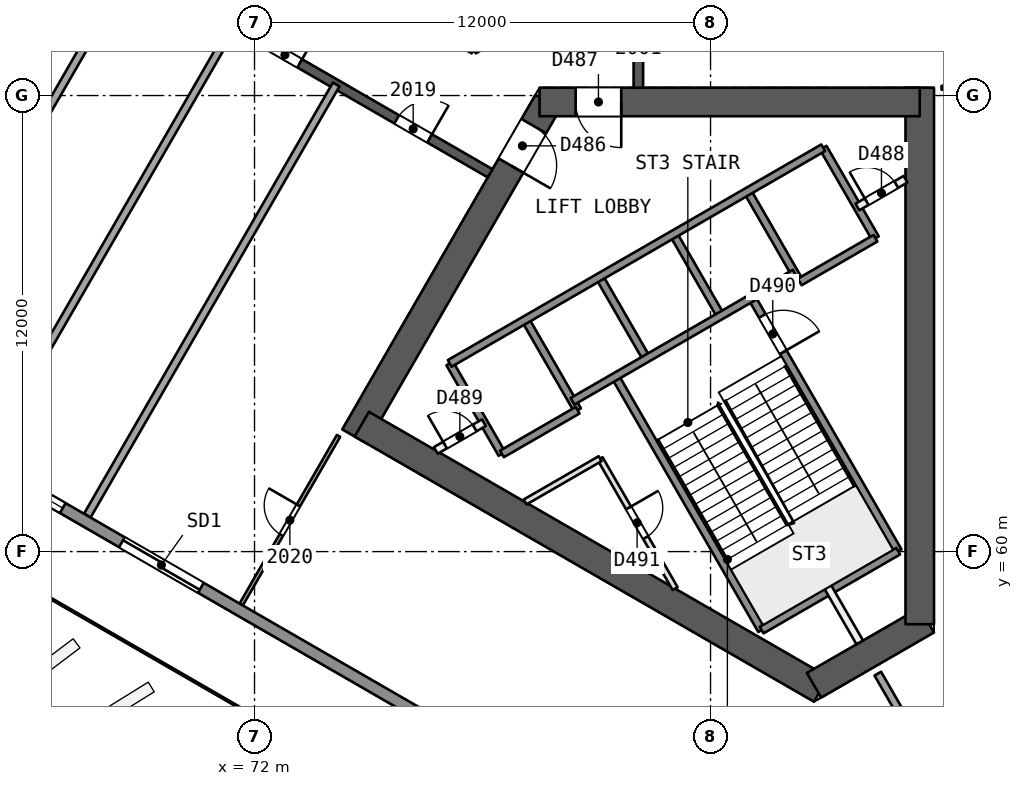
"""IFC4 building model, lengths in metres.
Left out: names, types, materials, properties, quantities, classifications, styles, units other than length and angle.
Written with IfcOpenShell. Run it as: python <this file> out.ifc"""

import sys

from ifc_helpers import new_model, si_unit, direction, frame, frame_2d, origin, place, context, subcontext, project, spatial, rectangle, extrude, element, fill, save


model = new_model("IFC4")
c1 = context("Model", 3, precision=1e-05, world=origin(), true_north=direction((0.0, 1.0)))
c2 = subcontext(c1, "Body", "Model", "MODEL_VIEW")
j1 = project(units=[si_unit("LENGTHUNIT", "METRE"), si_unit("PLANEANGLEUNIT", "RADIAN")], contexts=[c1])
p1 = place(None, origin())
s1 = spatial("IfcSite", under=j1, at=p1, CompositionType="ELEMENT")
p2 = place(p1, origin())
s2 = spatial("IfcBuilding", under=s1, at=p2, CompositionType="ELEMENT")
p3 = place(p2, frame((0.0, 0.0, 86.9)))
s3 = spatial("IfcBuildingStorey", under=s2, at=p3, CompositionType="ELEMENT", Elevation=86.9)
p4 = place(p3, frame((79.717, 71.831, 0.0), z_axis=(0.0, 0.0, 1.0), x_axis=(-0.499996230114, -0.866027580318, 0.0)))
e1 = element("IfcWall", 1, at=p4, inside=s3, PredefinedType="SHEAR", context=c2, shape_type="SweptSolid", body=[
    extrude(rectangle(XDim=10.164, YDim=0.75, at=frame_2d((5.082, 0.0))), origin(), (0.0, 0.0, 1.0), 3.7),
])
p5 = place(p4, frame((0.733, 0.0, 0.0)))
e2 = element("IfcOpeningElement", 2, at=p5, cuts=e1, PredefinedType="OPENING", context=c2, shape_type="SweptSolid", body=[
    extrude(rectangle(XDim=1.2, YDim=2.1, at=frame_2d((0.6, 1.05))), frame((0.0, 0.385, 0.0), z_axis=(0.0, -1.0, 0.0), x_axis=(1.0, 0.0, 0.0)), (0.0, 0.0, 1.0), 0.771),
])
p6 = place(p3, frame((74.822, 63.354, 0.0), z_axis=(0.0, 0.0, 1.0), x_axis=(0.8660248072, -0.500001033313, 0.0)))
e3 = element("IfcWall", 3, at=p6, inside=s3, PredefinedType="SHEAR", context=c2, shape_type="SweptSolid", body=[
    extrude(rectangle(XDim=13.958, YDim=0.75, at=frame_2d((6.979, 0.0))), origin(), (0.0, 0.0, 1.0), 3.7),
])
p7 = place(p3, frame((86.723, 56.483, 0.0), z_axis=(0.0, 0.0, 1.0), x_axis=(0.866017201164, 0.500014207086, 0.0)))
e4 = element("IfcWall", 4, at=p7, inside=s3, PredefinedType="SHEAR", context=c2, shape_type="SweptSolid", body=[
    extrude(rectangle(XDim=3.429, YDim=0.75, at=frame_2d((1.714, 0.0))), origin(), (0.0, 0.0, 1.0), 3.7),
])
p8 = place(p3, frame((89.505, 58.089, 0.0), z_axis=(0.0, 0.0, 1.0), x_axis=(0.0, 1.0, 0.0)))
e5 = element("IfcWall", 5, at=p8, inside=s3, PredefinedType="SHEAR", context=c2, shape_type="SweptSolid", body=[
    extrude(rectangle(XDim=14.117, YDim=0.75, at=frame_2d((7.059, 0.0))), origin(), (0.0, 0.0, 1.0), 3.7),
])
p9 = place(p3, frame((89.505, 71.831, 0.0), z_axis=(0.0, 0.0, 1.0), x_axis=(-1.0, 0.0, 0.0)))
e6 = element("IfcWall", 6, at=p9, inside=s3, PredefinedType="SHEAR", context=c2, shape_type="SweptSolid", body=[
    extrude(rectangle(XDim=10.005, YDim=0.75, at=frame_2d((5.002, 0.0))), origin(), (0.0, 0.0, 1.0), 3.7),
])
p10 = place(p9, frame((7.855, 0.0, 0.0)))
e7 = element("IfcOpeningElement", 7, at=p10, cuts=e6, PredefinedType="OPENING", context=c2, shape_type="SweptSolid", body=[
    extrude(rectangle(XDim=1.2, YDim=2.1, at=frame_2d((0.6, 1.05))), frame((0.0, 0.385, 0.0), z_axis=(0.0, -1.0, 0.0), x_axis=(1.0, 0.0, 0.0)), (0.0, 0.0, 1.0), 0.771),
])
p11 = place(p3, frame((82.1, 72.206, 0.0), z_axis=(0.0, 0.0, 1.0), x_axis=(0.0, 1.0, 0.0)))
e8 = element("IfcWall", 8, at=p11, inside=s3, PredefinedType="SHEAR", context=c2, shape_type="SweptSolid", body=[
    extrude(rectangle(XDim=15.588, YDim=0.25, at=frame_2d((7.794, 0.0))), origin(), (0.0, 0.0, 1.0), 3.2),
])
p12 = place(p11, frame((1.527, 0.0, 0.0)))
e9 = element("IfcOpeningElement", 9, at=p12, cuts=e8, PredefinedType="OPENING", context=c2, shape_type="SweptSolid", body=[
    extrude(rectangle(XDim=1.0, YDim=2.1, at=frame_2d((0.5, 1.05))), frame((0.0, 0.135, 0.0), z_axis=(0.0, -1.0, 0.0), x_axis=(1.0, 0.0, 0.0)), (0.0, 0.0, 1.0), 0.271),
])
p13 = place(p11, frame((8.694, 0.0, 0.0)))
e10 = element("IfcOpeningElement", 10, at=p13, cuts=e8, PredefinedType="OPENING", context=c2, shape_type="SweptSolid", body=[
    extrude(rectangle(XDim=1.1, YDim=2.1, at=frame_2d((0.55, 1.05))), frame((0.0, 0.135, 0.0), z_axis=(0.0, -1.0, 0.0), x_axis=(1.0, 0.0, 0.0)), (0.0, 0.0, 1.0), 0.271),
])
p14 = place(p11, frame((13.062, 0.0, 0.0)))
e11 = element("IfcOpeningElement", 11, at=p14, cuts=e8, PredefinedType="OPENING", context=c2, shape_type="SweptSolid", body=[
    extrude(rectangle(XDim=1.0, YDim=2.1, at=frame_2d((0.5, 1.05))), frame((0.0, 0.135, 0.0), z_axis=(0.0, -1.0, 0.0), x_axis=(1.0, 0.0, 0.0)), (0.0, 0.0, 1.0), 0.271),
])
p15 = place(p3, frame((64.7, 77.748, 0.0), z_axis=(0.0, 0.0, 1.0), x_axis=(0.866026492143, -0.499998114903, 0.0)))
e12 = element("IfcWall", 12, at=p15, inside=s3, PredefinedType="SHEAR", context=c2, shape_type="SweptSolid", body=[
    extrude(rectangle(XDim=15.588, YDim=0.25, at=frame_2d((7.794, 0.0))), origin(), (0.0, 0.0, 1.0), 3.2),
])
p16 = place(p15, frame((1.738, 0.0, 0.0)))
e13 = element("IfcOpeningElement", 13, at=p16, cuts=e12, PredefinedType="OPENING", context=c2, shape_type="SweptSolid", body=[
    extrude(rectangle(XDim=1.2, YDim=2.4, at=frame_2d((0.6, 1.2))), frame((0.0, 0.135, 0.0), z_axis=(0.0, -1.0, 0.0), x_axis=(1.0, 0.0, 0.0)), (0.0, 0.0, 1.0), 0.271),
])
p17 = place(p15, frame((5.785, 0.0, 0.0)))
e14 = element("IfcOpeningElement", 14, at=p17, cuts=e12, PredefinedType="OPENING", context=c2, shape_type="SweptSolid", body=[
    extrude(rectangle(XDim=0.9, YDim=2.1, at=frame_2d((0.45, 1.05))), frame((0.0, 0.135, 0.0), z_axis=(0.0, -1.0, 0.0), x_axis=(1.0, 0.0, 0.0)), (0.0, 0.0, 1.0), 0.271),
])
p18 = place(p15, frame((8.903, 0.0, 0.0)))
e15 = element("IfcOpeningElement", 15, at=p18, cuts=e12, PredefinedType="OPENING", context=c2, shape_type="SweptSolid", body=[
    extrude(rectangle(XDim=0.9, YDim=2.1, at=frame_2d((0.45, 1.05))), frame((0.0, 0.135, 0.0), z_axis=(0.0, -1.0, 0.0), x_axis=(1.0, 0.0, 0.0)), (0.0, 0.0, 1.0), 0.271),
])
p19 = place(p15, frame((12.75, 0.0, 0.0)))
e16 = element("IfcOpeningElement", 16, at=p19, cuts=e12, PredefinedType="OPENING", context=c2, shape_type="SweptSolid", body=[
    extrude(rectangle(XDim=1.0, YDim=2.1, at=frame_2d((0.5, 1.05))), frame((0.0, 0.135, 0.0), z_axis=(0.0, -1.0, 0.0), x_axis=(1.0, 0.0, 0.0)), (0.0, 0.0, 1.0), 0.271),
])
p20 = place(p3, frame((90.079, 72.206, 0.0), z_axis=(0.0, 0.0, 1.0), x_axis=(1.0, 0.0, 0.0)))
e17 = element("IfcWall", 17, at=p20, inside=s3, PredefinedType="PARTITIONING", context=c2, shape_type="SweptSolid", body=[
    extrude(rectangle(XDim=5.123, YDim=0.1, at=frame_2d((2.562, 0.0))), origin(), (0.0, 0.0, 1.0), 3.2),
])
p21 = place(p20, frame((2.112, 0.0, 0.0)))
e18 = element("IfcOpeningElement", 18, at=p21, cuts=e17, PredefinedType="OPENING", context=c2, shape_type="SweptSolid", body=[
    extrude(rectangle(XDim=0.9, YDim=2.1, at=frame_2d((0.45, 1.05))), frame((0.0, 0.061, 0.0), z_axis=(0.0, -1.0, 0.0), x_axis=(1.0, 0.0, 0.0)), (0.0, 0.0, 1.0), 0.121),
])
p22 = place(p3, frame((88.401, 56.789, 0.0), z_axis=(0.0, 0.0, 1.0), x_axis=(0.499995498429, -0.866028002752, 0.0)))
e19 = element("IfcWall", 19, at=p22, inside=s3, PredefinedType="PARTITIONING", context=c2, shape_type="SweptSolid", body=[
    extrude(rectangle(XDim=8.565, YDim=0.2, at=frame_2d((4.283, 0.0))), origin(), (0.0, 0.0, 1.0), 3.2),
])
for number, where, z_axis, x_axis in (
    (20, (62.199, 64.063, 0.0), (0.0, 0.0, 1.0), (0.5, 0.866, 0.0)),
    (21, (64.899, 62.504, 0.0), (0.0, 0.0, 1.0), (0.5, 0.866, 0.0)),
    (22, (67.599, 60.946, 0.0), (0.0, 0.0, 1.0), (0.5, 0.866, 0.0)),
):
    element("IfcWall", number, at=place(p3, frame(where, z_axis=z_axis, x_axis=x_axis)), inside=s3, PredefinedType="PARTITIONING", context=c2, shape_type="SweptSolid", body=[
        extrude(rectangle(XDim=13.102, YDim=0.2, at=frame_2d((6.551, 0.0))), origin(), (0.0, 0.0, 1.0), 3.2),
    ])
p23 = place(p3, frame((71.649, 58.607, 0.0), z_axis=(0.0, 0.0, 1.0), x_axis=(0.499972702148, 0.866041163633, 0.0)))
e23 = element("IfcWall", 23, at=p23, inside=s3, PredefinedType="PARTITIONING", context=c2, shape_type="SweptSolid", body=[
    extrude(rectangle(XDim=5.123, YDim=0.1, at=frame_2d((2.562, 0.0))), origin(), (0.0, 0.0, 1.0), 3.2),
])
p24 = place(p23, frame((2.112, 0.0, 0.0)))
e24 = element("IfcOpeningElement", 24, at=p24, cuts=e23, PredefinedType="OPENING", context=c2, shape_type="SweptSolid", body=[
    extrude(rectangle(XDim=0.9, YDim=2.1, at=frame_2d((0.45, 1.05))), frame((0.0, 0.061, 0.0), z_axis=(0.0, -1.0, 0.0), x_axis=(1.0, 0.0, 0.0)), (0.0, 0.0, 1.0), 0.121),
])
p25 = place(p3, frame((90.165, 47.745, 0.0), z_axis=(0.0, 0.0, 1.0), x_axis=(-0.866025940441, 0.499999070483, 0.0)))
e25 = element("IfcWall", 25, at=p25, inside=s3, PredefinedType="SOLIDWALL", context=c2, shape_type="SweptSolid", body=[
    extrude(rectangle(XDim=58.522, YDim=0.3, at=frame_2d((29.261, 0.0))), origin(), (0.0, 0.0, 1.0), 3.2),
])
p26 = place(p25, frame((44.294, 0.0, 0.0)))
e26 = element("IfcOpeningElement", 26, at=p26, cuts=e25, PredefinedType="OPENING", context=c2, shape_type="SweptSolid", body=[
    extrude(rectangle(XDim=2.4, YDim=2.4, at=frame_2d((1.2, 1.2))), frame((0.0, 0.161, 0.0), z_axis=(0.0, -1.0, 0.0), x_axis=(1.0, 0.0, 0.0)), (0.0, 0.0, 1.0), 0.321),
])
p27 = place(p25, frame((22.605, 0.0, 0.0)))
e27 = element("IfcOpeningElement", 27, at=p27, cuts=e25, PredefinedType="OPENING", context=c2, shape_type="SweptSolid", body=[
    extrude(rectangle(XDim=2.4, YDim=2.4, at=frame_2d((1.2, 1.2))), frame((0.0, 0.161, 0.0), z_axis=(0.0, -1.0, 0.0), x_axis=(1.0, 0.0, 0.0)), (0.0, 0.0, 1.0), 0.321),
])
p28 = place(p25, frame((10.658, 0.0, 0.0)))
e28 = element("IfcOpeningElement", 28, at=p28, cuts=e25, PredefinedType="OPENING", context=c2, shape_type="SweptSolid", body=[
    extrude(rectangle(XDim=2.4, YDim=2.4, at=frame_2d((1.2, 1.2))), frame((0.0, 0.161, 0.0), z_axis=(0.0, -1.0, 0.0), x_axis=(1.0, 0.0, 0.0)), (0.0, 0.0, 1.0), 0.321),
])
p29 = place(p25, frame((29.92, 0.0, 0.9)))
e29 = element("IfcOpeningElement", 29, at=p29, cuts=e25, PredefinedType="OPENING", context=c2, shape_type="SweptSolid", body=[
    extrude(rectangle(XDim=1.8, YDim=1.5, at=frame_2d((0.9, 0.75))), frame((0.0, 0.161, 0.0), z_axis=(0.0, -1.0, 0.0), x_axis=(1.0, 0.0, 0.0)), (0.0, 0.0, 1.0), 0.321),
])
p30 = place(p25, frame((26.802, 0.0, 0.9)))
e30 = element("IfcOpeningElement", 30, at=p30, cuts=e25, PredefinedType="OPENING", context=c2, shape_type="SweptSolid", body=[
    extrude(rectangle(XDim=1.8, YDim=1.5, at=frame_2d((0.9, 0.75))), frame((0.0, 0.161, 0.0), z_axis=(0.0, -1.0, 0.0), x_axis=(1.0, 0.0, 0.0)), (0.0, 0.0, 1.0), 0.321),
])
p31 = place(p3, frame((77.135, 64.952, 0.0), z_axis=(0.0, 0.0, 1.0), x_axis=(0.499996545922, -0.866027397988, 0.0)))
e31 = element("IfcWall", 31, at=p31, inside=s3, PredefinedType="SOLIDWALL", context=c2, shape_type="SweptSolid", body=[
    extrude(rectangle(XDim=2.75, YDim=0.2, at=frame_2d((1.375, 0.0))), origin(), (0.0, 0.0, 1.0), 3.2),
])
p32 = place(p3, frame((81.094, 62.445, 0.0), z_axis=(0.0, 0.0, 1.0), x_axis=(0.499990112884, -0.866031112038, 0.0)))
e32 = element("IfcWall", 32, at=p32, inside=s3, PredefinedType="PARTITIONING", context=c2, shape_type="SweptSolid", body=[
    extrude(rectangle(XDim=3.948, YDim=0.15, at=frame_2d((1.974, 0.0))), origin(), (0.0, 0.0, 1.0), 3.2),
])
p33 = place(p32, frame((1.496, 0.0, 0.0)))
e33 = element("IfcOpeningElement", 33, at=p33, cuts=e32, PredefinedType="OPENING", context=c2, shape_type="SweptSolid", body=[
    extrude(rectangle(XDim=0.9, YDim=2.1, at=frame_2d((0.45, 1.05))), frame((0.0, 0.085, 0.0), z_axis=(0.0, -1.0, 0.0), x_axis=(1.0, 0.0, 0.0)), (0.0, 0.0, 1.0), 0.171),
])
p34 = place(p3, frame((79.127, 66.102, 0.0), z_axis=(0.0, 0.0, 1.0), x_axis=(0.499996545922, -0.866027397988, 0.0)))
e34 = element("IfcWall", 34, at=p34, inside=s3, PredefinedType="SOLIDWALL", context=c2, shape_type="SweptSolid", body=[
    extrude(rectangle(XDim=2.75, YDim=0.2, at=frame_2d((1.375, 0.0))), origin(), (0.0, 0.0, 1.0), 3.2),
])
p35 = place(p3, frame((81.493, 64.604, 0.0), z_axis=(0.0, 0.0, 1.0), x_axis=(0.500006057782, -0.866021906294, 0.0)))
e35 = element("IfcWall", 35, at=p35, inside=s3, PredefinedType="SOLIDWALL", context=c2, shape_type="SweptSolid", body=[
    extrude(rectangle(XDim=7.7, YDim=0.2, at=frame_2d((3.85, 0.0))), origin(), (0.0, 0.0, 1.0), 3.2),
])
p36 = place(p3, frame((81.076, 67.227, 0.0), z_axis=(0.0, 0.0, 1.0), x_axis=(0.50000366821, -0.866023285932, 0.0)))
e36 = element("IfcWall", 36, at=p36, inside=s3, PredefinedType="SOLIDWALL", context=c2, shape_type="SweptSolid", body=[
    extrude(rectangle(XDim=2.48, YDim=0.2, at=frame_2d((1.24, 0.0))), origin(), (0.0, 0.0, 1.0), 3.2),
])
p37 = place(p3, frame((87.09, 59.06, 0.0), z_axis=(0.0, 0.0, 1.0), x_axis=(0.499937194881, -0.866061661301, 0.0)))
e37 = element("IfcWall", 37, at=p37, inside=s3, PredefinedType="PARTITIONING", context=c2, shape_type="SweptSolid", body=[
    extrude(rectangle(XDim=1.673, YDim=0.2, at=frame_2d((0.836, 0.0))), origin(), (0.0, 0.0, 1.0), 3.2),
])
p38 = place(p3, frame((83.024, 68.352, 0.0), z_axis=(0.0, 0.0, 1.0), x_axis=(0.50000366821, -0.866023285932, 0.0)))
e38 = element("IfcWall", 38, at=p38, inside=s3, PredefinedType="SOLIDWALL", context=c2, shape_type="SweptSolid", body=[
    extrude(rectangle(XDim=2.48, YDim=0.2, at=frame_2d((1.24, 0.0))), origin(), (0.0, 0.0, 1.0), 3.2),
])
p39 = place(p3, frame((85.087, 66.679, 0.0), z_axis=(0.0, 0.0, 1.0), x_axis=(0.500019787375, -0.866013979237, 0.0)))
e39 = element("IfcWall", 39, at=p39, inside=s3, PredefinedType="SOLIDWALL", context=c2, shape_type="SweptSolid", body=[
    extrude(rectangle(XDim=7.7, YDim=0.2, at=frame_2d((3.85, 0.0))), origin(), (0.0, 0.0, 1.0), 3.2),
])
p40 = place(p39, frame((0.55, 0.0, 0.0)))
e40 = element("IfcOpeningElement", 40, at=p40, cuts=e39, PredefinedType="OPENING", context=c2, shape_type="SweptSolid", body=[
    extrude(rectangle(XDim=1.1, YDim=2.1, at=frame_2d((0.55, 1.05))), frame((0.0, 0.11, 0.0), z_axis=(0.0, -1.0, 0.0), x_axis=(1.0, 0.0, 0.0)), (0.0, 0.0, 1.0), 0.221),
])
for number, where, z_axis, x_axis in (
    (41, (84.973, 69.477, 0.0), (0.0, 0.0, 1.0), (0.5, -0.866, 0.0)),
    (42, (86.965, 70.626, 0.0), (0.0, 0.0, 1.0), (0.5, -0.866, 0.0)),
):
    element("IfcWall", number, at=place(p3, frame(where, z_axis=z_axis, x_axis=x_axis)), inside=s3, PredefinedType="SOLIDWALL", context=c2, shape_type="SweptSolid", body=[
        extrude(rectangle(XDim=2.75, YDim=0.2, at=frame_2d((1.375, 0.0))), origin(), (0.0, 0.0, 1.0), 3.2),
    ])
p41 = place(p3, frame((77.135, 64.952, 0.0), z_axis=(0.0, 0.0, 1.0), x_axis=(0.866031916153, 0.499988720078, 0.0)))
e43 = element("IfcWall", 43, at=p41, inside=s3, PredefinedType="SOLIDWALL", context=c2, shape_type="SweptSolid", body=[
    extrude(rectangle(XDim=11.35, YDim=0.2, at=frame_2d((5.675, 0.0))), origin(), (0.0, 0.0, 1.0), 3.2),
])
p42 = place(p3, frame((76.77, 62.662, 0.0), z_axis=(0.0, 0.0, 1.0), x_axis=(0.866054810376, 0.49994906283, 0.0)))
e44 = element("IfcWall", 44, at=p42, inside=s3, PredefinedType="PARTITIONING", context=c2, shape_type="SweptSolid", body=[
    extrude(rectangle(XDim=1.461, YDim=0.2, at=frame_2d((0.73, 0.0))), origin(), (0.0, 0.0, 1.0), 3.2),
])
p43 = place(p42, frame((0.281, 0.0, 0.0)))
e45 = element("IfcOpeningElement", 45, at=p43, cuts=e44, PredefinedType="OPENING", context=c2, shape_type="SweptSolid", body=[
    extrude(rectangle(XDim=0.9, YDim=2.1, at=frame_2d((0.45, 1.05))), frame((0.0, 0.11, 0.0), z_axis=(0.0, -1.0, 0.0), x_axis=(1.0, 0.0, 0.0)), (0.0, 0.0, 1.0), 0.221),
])
p44 = place(p3, frame((87.865, 69.068, 0.0), z_axis=(0.0, 0.0, 1.0), x_axis=(0.865982457891, 0.500074377092, 0.0)))
e46 = element("IfcWall", 46, at=p44, inside=s3, PredefinedType="PARTITIONING", context=c2, shape_type="SweptSolid", body=[
    extrude(rectangle(XDim=1.461, YDim=0.2, at=frame_2d((0.73, 0.0))), origin(), (0.0, 0.0, 1.0), 3.2),
])
p45 = place(p44, frame((0.281, 0.0, 0.0)))
e47 = element("IfcOpeningElement", 47, at=p45, cuts=e46, PredefinedType="OPENING", context=c2, shape_type="SweptSolid", body=[
    extrude(rectangle(XDim=0.9, YDim=2.1, at=frame_2d((0.45, 1.05))), frame((0.0, 0.11, 0.0), z_axis=(0.0, -1.0, 0.0), x_axis=(1.0, 0.0, 0.0)), (0.0, 0.0, 1.0), 0.221),
])
p46 = place(p3, frame((80.367, 63.954, 0.0), z_axis=(0.0, 0.0, 1.0), x_axis=(0.866026575979, 0.499997969693, 0.0)))
e48 = element("IfcWall", 48, at=p46, inside=s3, PredefinedType="SOLIDWALL", context=c2, shape_type="SweptSolid", body=[
    extrude(rectangle(XDim=6.75, YDim=0.2, at=frame_2d((3.375, 0.0))), origin(), (0.0, 0.0, 1.0), 3.2),
])
p47 = place(p3, frame((78.51, 62.57, 0.0), z_axis=(0.0, 0.0, 1.0), x_axis=(0.866053019151, 0.499952165731, 0.0)))
e49 = element("IfcWall", 49, at=p47, inside=s3, PredefinedType="SOLIDWALL", context=c2, shape_type="SweptSolid", body=[
    extrude(rectangle(XDim=2.3, YDim=0.2, at=frame_2d((1.15, 0.0))), origin(), (0.0, 0.0, 1.0), 3.2),
])
p48 = place(p3, frame((86.348, 67.095, 0.0), z_axis=(0.0, 0.0, 1.0), x_axis=(0.86602648383, 0.499998129301, 0.0)))
e50 = element("IfcWall", 50, at=p48, inside=s3, PredefinedType="SOLIDWALL", context=c2, shape_type="SweptSolid", body=[
    extrude(rectangle(XDim=2.3, YDim=0.2, at=frame_2d((1.15, 0.0))), origin(), (0.0, 0.0, 1.0), 3.2),
])
p49 = place(p3, frame((79.12, 61.305, 0.0), z_axis=(0.0, 0.0, 1.0), x_axis=(0.866046471269, 0.499963508271, 0.0)))
e51 = element("IfcWall", 51, at=p49, inside=s3, PredefinedType="PARTITIONING", context=c2, shape_type="SweptSolid", body=[
    extrude(rectangle(XDim=2.28, YDim=0.15, at=frame_2d((1.14, 0.0))), origin(), (0.0, 0.0, 1.0), 3.2),
])
p50 = place(p3, frame((85.343, 57.935, 0.0), z_axis=(0.0, 0.0, 1.0), x_axis=(0.866004344652, 0.500036473714, 0.0)))
e52 = element("IfcWall", 52, at=p50, inside=s3, PredefinedType="SOLIDWALL", context=c2, shape_type="SweptSolid", body=[
    extrude(rectangle(XDim=4.15, YDim=0.2, at=frame_2d((2.075, 0.0))), origin(), (0.0, 0.0, 1.0), 3.2),
])
p51 = place(p3, frame((67.702, 78.948, 0.0), z_axis=(0.0, 0.0, 1.0), x_axis=(0.866026658274, -0.499997827154, 0.0)))
e53 = element("IfcWall", 53, at=p51, inside=s3, PredefinedType="PARTITIONING", context=c2, shape_type="SweptSolid", body=[
    extrude(rectangle(XDim=11.588, YDim=0.1, at=frame_2d((5.794, 0.0))), origin(), (0.0, 0.0, 1.0), 3.2),
])
p52 = place(p3, frame((77.798, 73.154, 0.0), z_axis=(0.0, 0.0, 1.0), x_axis=(0.866041268327, 0.499972520799, 0.0)))
e54 = element("IfcWall", 54, at=p52, inside=s3, PredefinedType="PARTITIONING", context=c2, shape_type="SweptSolid", body=[
    extrude(rectangle(XDim=2.0, YDim=0.1, at=frame_2d((1.0, 0.0))), origin(), (0.0, 0.0, 1.0), 3.2),
])
p53 = place(p18, origin())
e55 = element("IfcDoor", 55, at=p53, inside=s3, OperationType="SINGLE_SWING_RIGHT", PredefinedType="NOTDEFINED", context=c2, shape_type="SweptSolid", body=[
    extrude(rectangle(XDim=0.9, YDim=2.1, at=frame_2d((0.45, 1.05))), frame((0.0, 0.025, 0.0), z_axis=(0.0, -1.0, 0.0), x_axis=(1.0, 0.0, 0.0)), (0.0, 0.0, 1.0), 0.05),
])
fill(e15, e55)
p54 = place(p19, origin())
e56 = element("IfcDoor", 56, at=p54, inside=s3, OperationType="SINGLE_SWING_RIGHT", PredefinedType="NOTDEFINED", context=c2, shape_type="SweptSolid", body=[
    extrude(rectangle(XDim=1.0, YDim=2.1, at=frame_2d((0.5, 1.05))), frame((0.0, 0.025, 0.0), z_axis=(0.0, -1.0, 0.0), x_axis=(1.0, 0.0, 0.0)), (0.0, 0.0, 1.0), 0.05),
])
fill(e16, e56)
p55 = place(p24, origin())
e57 = element("IfcDoor", 57, at=p55, inside=s3, OperationType="SINGLE_SWING_RIGHT", PredefinedType="NOTDEFINED", context=c2, shape_type="SweptSolid", body=[
    extrude(rectangle(XDim=0.9, YDim=2.1, at=frame_2d((0.45, 1.05))), frame((0.0, 0.025, 0.0), z_axis=(0.0, -1.0, 0.0), x_axis=(1.0, 0.0, 0.0)), (0.0, 0.0, 1.0), 0.05),
])
fill(e24, e57)
p56 = place(p27, origin())
e58 = element("IfcDoor", 58, at=p56, inside=s3, OperationType="SLIDING_TO_RIGHT", PredefinedType="NOTDEFINED", context=c2, shape_type="SweptSolid", body=[
    extrude(rectangle(XDim=2.4, YDim=2.4, at=frame_2d((1.2, 1.2))), frame((0.0, 0.025, 0.0), z_axis=(0.0, -1.0, 0.0), x_axis=(1.0, 0.0, 0.0)), (0.0, 0.0, 1.0), 0.05),
])
fill(e27, e58)
p57 = place(p30, origin())
e59 = element("IfcWindow", 59, at=p57, inside=s3, PartitioningType="SINGLE_PANEL", PredefinedType="WINDOW", context=c2, shape_type="SweptSolid", body=[
    extrude(rectangle(XDim=1.8, YDim=1.5, at=frame_2d((0.9, 0.75))), frame((0.0, 0.03, 0.0), z_axis=(0.0, -1.0, 0.0), x_axis=(1.0, 0.0, 0.0)), (0.0, 0.0, 1.0), 0.06),
])
fill(e30, e59)
p58 = place(p5, origin())
e60 = element("IfcDoor", 60, at=p58, inside=s3, OperationType="SINGLE_SWING_RIGHT", PredefinedType="NOTDEFINED", context=c2, shape_type="SweptSolid", body=[
    extrude(rectangle(XDim=1.2, YDim=2.1, at=frame_2d((0.6, 1.05))), frame((0.0, 0.025, 0.0), z_axis=(0.0, -1.0, 0.0), x_axis=(1.0, 0.0, 0.0)), (0.0, 0.0, 1.0), 0.05),
])
fill(e2, e60)
p59 = place(p10, origin())
e61 = element("IfcDoor", 61, at=p59, inside=s3, OperationType="SINGLE_SWING_LEFT", PredefinedType="NOTDEFINED", context=c2, shape_type="SweptSolid", body=[
    extrude(rectangle(XDim=1.2, YDim=2.1, at=frame_2d((0.6, 1.05))), frame((0.0, 0.025, 0.0), z_axis=(0.0, -1.0, 0.0), x_axis=(1.0, 0.0, 0.0)), (0.0, 0.0, 1.0), 0.05),
])
fill(e7, e61)
p60 = place(p45, origin())
e62 = element("IfcDoor", 62, at=p60, inside=s3, OperationType="SINGLE_SWING_LEFT", PredefinedType="NOTDEFINED", context=c2, shape_type="SweptSolid", body=[
    extrude(rectangle(XDim=0.9, YDim=2.1, at=frame_2d((0.45, 1.05))), frame((0.0, 0.025, 0.0), z_axis=(0.0, -1.0, 0.0), x_axis=(1.0, 0.0, 0.0)), (0.0, 0.0, 1.0), 0.05),
])
fill(e47, e62)
p61 = place(p43, origin())
e63 = element("IfcDoor", 63, at=p61, inside=s3, OperationType="SINGLE_SWING_LEFT", PredefinedType="NOTDEFINED", context=c2, shape_type="SweptSolid", body=[
    extrude(rectangle(XDim=0.9, YDim=2.1, at=frame_2d((0.45, 1.05))), frame((0.0, 0.025, 0.0), z_axis=(0.0, -1.0, 0.0), x_axis=(1.0, 0.0, 0.0)), (0.0, 0.0, 1.0), 0.05),
])
fill(e45, e63)
p62 = place(p40, origin())
e64 = element("IfcDoor", 64, at=p62, inside=s3, OperationType="SINGLE_SWING_RIGHT", PredefinedType="NOTDEFINED", context=c2, shape_type="SweptSolid", body=[
    extrude(rectangle(XDim=1.1, YDim=2.1, at=frame_2d((0.55, 1.05))), frame((0.0, 0.025, 0.0), z_axis=(0.0, -1.0, 0.0), x_axis=(1.0, 0.0, 0.0)), (0.0, 0.0, 1.0), 0.05),
])
fill(e40, e64)
p63 = place(p33, origin())
e65 = element("IfcDoor", 65, at=p63, inside=s3, OperationType="SINGLE_SWING_LEFT", PredefinedType="NOTDEFINED", context=c2, shape_type="SweptSolid", body=[
    extrude(rectangle(XDim=0.9, YDim=2.1, at=frame_2d((0.45, 1.05))), frame((0.0, 0.025, 0.0), z_axis=(0.0, -1.0, 0.0), x_axis=(1.0, 0.0, 0.0)), (0.0, 0.0, 1.0), 0.05),
])
fill(e33, e65)
save(model, sys.argv[1])
